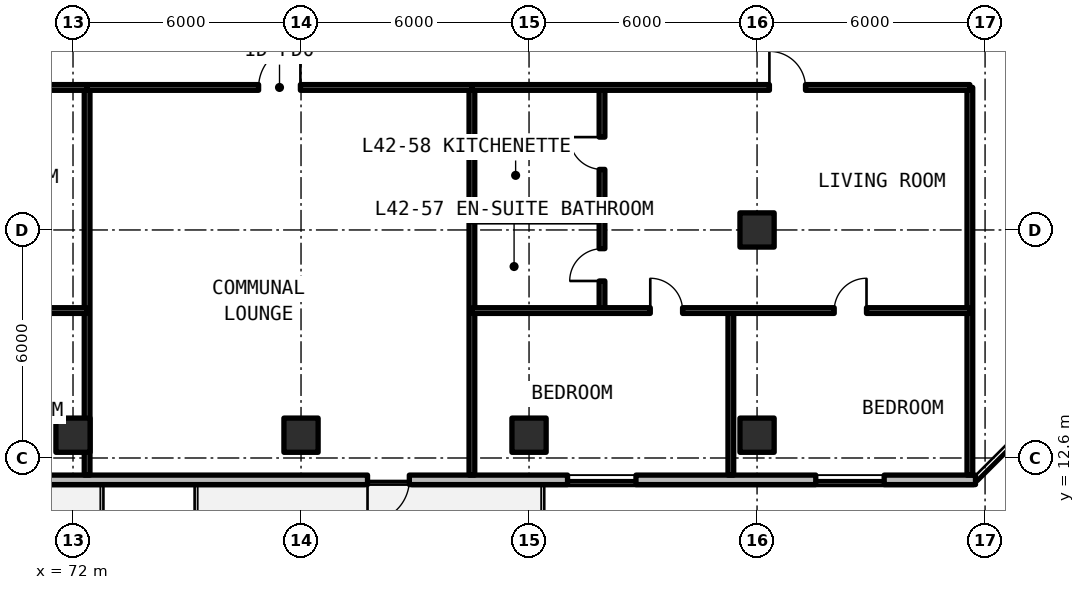
"""IFC4 building model, lengths in metres.
Left out: names, types, materials, properties, quantities, classifications, styles, units other than length and angle.
Written with IfcOpenShell. Run it as: python <this file> out.ifc"""

import sys

from ifc_helpers import new_model, si_unit, direction, frame, frame_2d, origin, origin_2d, place, context, subcontext, project, spatial, rectangle, extrude, element, fill, save


model = new_model("IFC4")
c1 = context("Model", 3, precision=1e-05, world=origin(), true_north=direction((0.0, 1.0)))
c2 = subcontext(c1, "Body", "Model", "MODEL_VIEW")
j1 = project(units=[si_unit("LENGTHUNIT", "METRE"), si_unit("PLANEANGLEUNIT", "RADIAN")], contexts=[c1])
p1 = place(None, origin())
s1 = spatial("IfcSite", under=j1, at=p1, CompositionType="ELEMENT")
p2 = place(p1, origin())
s2 = spatial("IfcBuilding", under=s1, at=p2, CompositionType="ELEMENT")
p3 = place(p2, frame((0.0, 0.0, 151.8)))
s3 = spatial("IfcBuildingStorey", under=s2, at=p3, CompositionType="ELEMENT", Elevation=151.8)
for number, where, z_axis, x_axis in (
    (1, (90.0, 18.6, 0.0), (0.0, 0.0, 1.0), (1.0, 0.0, 0.0)),
    (2, (72.0, 13.2, 0.0), (0.0, 0.0, 1.0), (1.0, 0.0, 0.0)),
    (3, (78.0, 13.2, 0.0), (0.0, 0.0, 1.0), (1.0, 0.0, 0.0)),
    (4, (84.0, 13.2, 0.0), (0.0, 0.0, 1.0), (1.0, 0.0, 0.0)),
    (5, (90.0, 13.2, 0.0), (0.0, 0.0, 1.0), (1.0, 0.0, 0.0)),
):
    element("IfcColumn", number, at=place(p3, frame(where, z_axis=z_axis, x_axis=x_axis)), inside=s3, PredefinedType="COLUMN", context=c2, shape_type="SweptSolid", body=[
        extrude(rectangle(XDim=0.9, YDim=0.9, at=origin_2d()), origin(), (0.0, 0.0, 1.0), 3.3),
    ])
p4 = place(p3, frame((52.125, 12.025, 0.0), z_axis=(0.0, 0.0, 1.0), x_axis=(1.0, 0.0, 0.0)))
e6 = element("IfcWall", 6, at=p4, inside=s3, PredefinedType="SOLIDWALL", context=c2, shape_type="SweptSolid", body=[
    extrude(rectangle(XDim=43.623, YDim=0.25, at=frame_2d((21.812, 0.0))), origin(), (0.0, 0.0, 1.0), 3.08),
])
p5 = place(p4, frame((15.775, 0.0, 0.0)))
e7 = element("IfcOpeningElement", 7, at=p5, cuts=e6, PredefinedType="OPENING", context=c2, shape_type="SweptSolid", body=[
    extrude(rectangle(XDim=1.1, YDim=2.15, at=frame_2d((0.55, 1.075))), frame((0.0, 0.135, 0.0), z_axis=(0.0, -1.0, 0.0), x_axis=(1.0, 0.0, 0.0)), (0.0, 0.0, 1.0), 0.27),
])
p6 = place(p4, frame((27.625, 0.0, 0.0)))
e8 = element("IfcOpeningElement", 8, at=p6, cuts=e6, PredefinedType="OPENING", context=c2, shape_type="SweptSolid", body=[
    extrude(rectangle(XDim=1.1, YDim=2.15, at=frame_2d((0.55, 1.075))), frame((0.0, 0.135, 0.0), z_axis=(0.0, -1.0, 0.0), x_axis=(1.0, 0.0, 0.0)), (0.0, 0.0, 1.0), 0.27),
])
p7 = place(p4, frame((2.669, 0.0, 0.78)))
e9 = element("IfcOpeningElement", 9, at=p7, cuts=e6, PredefinedType="OPENING", context=c2, shape_type="SweptSolid", body=[
    extrude(rectangle(XDim=1.8, YDim=1.66, at=frame_2d((0.9, 0.83))), frame((0.0, 0.135, 0.0), z_axis=(0.0, -1.0, 0.0), x_axis=(1.0, 0.0, 0.0)), (0.0, 0.0, 1.0), 0.27),
])
p8 = place(p4, frame((9.659, 0.0, 0.78)))
e10 = element("IfcOpeningElement", 10, at=p8, cuts=e6, PredefinedType="OPENING", context=c2, shape_type="SweptSolid", body=[
    extrude(rectangle(XDim=1.8, YDim=1.66, at=frame_2d((0.9, 0.83))), frame((0.0, 0.135, 0.0), z_axis=(0.0, -1.0, 0.0), x_axis=(1.0, 0.0, 0.0)), (0.0, 0.0, 1.0), 0.27),
])
p9 = place(p4, frame((32.888, 0.0, 0.78)))
e11 = element("IfcOpeningElement", 11, at=p9, cuts=e6, PredefinedType="OPENING", context=c2, shape_type="SweptSolid", body=[
    extrude(rectangle(XDim=1.8, YDim=1.66, at=frame_2d((0.9, 0.83))), frame((0.0, 0.135, 0.0), z_axis=(0.0, -1.0, 0.0), x_axis=(1.0, 0.0, 0.0)), (0.0, 0.0, 1.0), 0.27),
])
p10 = place(p4, frame((39.42, 0.0, 0.78)))
e12 = element("IfcOpeningElement", 12, at=p10, cuts=e6, PredefinedType="OPENING", context=c2, shape_type="SweptSolid", body=[
    extrude(rectangle(XDim=1.8, YDim=1.66, at=frame_2d((0.9, 0.83))), frame((0.0, 0.135, 0.0), z_axis=(0.0, -1.0, 0.0), x_axis=(1.0, 0.0, 0.0)), (0.0, 0.0, 1.0), 0.27),
])
for number, where, z_axis, x_axis in (
    (13, (95.6, 12.15, 0.0), (0.0, 0.0, 1.0), (0.0, 1.0, 0.0)),
    (14, (72.371, 12.15, 0.0), (0.0, 0.0, 1.0), (0.0, 1.0, 0.0)),
):
    element("IfcWall", number, at=place(p3, frame(where, z_axis=z_axis, x_axis=x_axis)), inside=s3, PredefinedType="SOLIDWALL", context=c2, shape_type="SweptSolid", body=[
        extrude(rectangle(XDim=10.2, YDim=0.15, at=frame_2d((5.1, 0.0))), origin(), (0.0, 0.0, 1.0), 2.35),
    ])
p11 = place(p3, frame((59.267, 16.479, 0.0), z_axis=(0.0, 0.0, 1.0), x_axis=(1.0, 0.0, 0.0)))
e15 = element("IfcWall", 15, at=p11, inside=s3, PredefinedType="PARTITIONING", context=c2, shape_type="SweptSolid", body=[
    extrude(rectangle(XDim=13.104, YDim=0.15, at=frame_2d((6.552, 0.0))), origin(), (0.0, 0.0, 1.0), 2.35),
])
p12 = place(p11, frame((4.308, 0.0, 0.0)))
e16 = element("IfcOpeningElement", 16, at=p12, cuts=e15, PredefinedType="OPENING", context=c2, shape_type="SweptSolid", body=[
    extrude(rectangle(XDim=0.85, YDim=2.1, at=frame_2d((0.425, 1.05))), frame((0.0, 0.085, 0.0), z_axis=(0.0, -1.0, 0.0), x_axis=(1.0, 0.0, 0.0)), (0.0, 0.0, 1.0), 0.17),
])
p13 = place(p11, frame((9.534, 0.0, 0.0)))
e17 = element("IfcOpeningElement", 17, at=p13, cuts=e15, PredefinedType="OPENING", context=c2, shape_type="SweptSolid", body=[
    extrude(rectangle(XDim=0.85, YDim=2.1, at=frame_2d((0.425, 1.05))), frame((0.0, 0.085, 0.0), z_axis=(0.0, -1.0, 0.0), x_axis=(1.0, 0.0, 0.0)), (0.0, 0.0, 1.0), 0.17),
])
p14 = place(p3, frame((59.267, 22.35, 0.0), z_axis=(0.0, 0.0, 1.0), x_axis=(1.0, 0.0, 0.0)))
e18 = element("IfcWall", 18, at=p14, inside=s3, PredefinedType="SOLIDWALL", context=c2, shape_type="SweptSolid", body=[
    extrude(rectangle(XDim=13.104, YDim=0.15, at=frame_2d((6.552, 0.0))), origin(), (0.0, 0.0, 1.0), 2.35),
])
p15 = place(p14, frame((7.443, 0.0, 0.0)))
e19 = element("IfcOpeningElement", 19, at=p15, cuts=e18, PredefinedType="OPENING", context=c2, shape_type="SweptSolid", body=[
    extrude(rectangle(XDim=0.95, YDim=2.15, at=frame_2d((0.475, 1.075))), frame((0.0, 0.085, 0.0), z_axis=(0.0, -1.0, 0.0), x_axis=(1.0, 0.0, 0.0)), (0.0, 0.0, 1.0), 0.17),
])
p16 = place(p3, frame((82.497, 12.15, 0.0), z_axis=(0.0, 0.0, 1.0), x_axis=(0.0, 1.0, 0.0)))
e20 = element("IfcWall", 20, at=p16, inside=s3, PredefinedType="SOLIDWALL", context=c2, shape_type="SweptSolid", body=[
    extrude(rectangle(XDim=10.2, YDim=0.15, at=frame_2d((5.1, 0.0))), origin(), (0.0, 0.0, 1.0), 2.35),
])
p17 = place(p3, frame((72.371, 22.35, 0.0), z_axis=(0.0, 0.0, 1.0), x_axis=(1.0, 0.0, 0.0)))
e21 = element("IfcWall", 21, at=p17, inside=s3, PredefinedType="SOLIDWALL", context=c2, shape_type="SweptSolid", body=[
    extrude(rectangle(XDim=10.125, YDim=0.15, at=frame_2d((5.063, 0.0))), origin(), (0.0, 0.0, 1.0), 2.35),
])
p18 = place(p17, frame((4.513, 0.0, 0.0)))
e22 = element("IfcOpeningElement", 22, at=p18, cuts=e21, PredefinedType="OPENING", context=c2, shape_type="SweptSolid", body=[
    extrude(rectangle(XDim=1.1, YDim=2.15, at=frame_2d((0.55, 1.075))), frame((0.0, 0.085, 0.0), z_axis=(0.0, -1.0, 0.0), x_axis=(1.0, 0.0, 0.0)), (0.0, 0.0, 1.0), 0.17),
])
p19 = place(p3, frame((82.497, 18.886, 0.0), z_axis=(0.0, 0.0, 1.0), x_axis=(1.0, 0.0, 0.0)))
e23 = element("IfcWall", 23, at=p19, inside=s3, PredefinedType="PARTITIONING", context=c2, shape_type="SweptSolid", body=[
    extrude(rectangle(XDim=3.423, YDim=0.15, at=frame_2d((1.712, 0.0))), origin(), (0.0, 0.0, 1.0), 2.35),
])
p20 = place(p3, frame((85.92, 16.479, 0.0), z_axis=(0.0, 0.0, 1.0), x_axis=(0.0, 1.0, 0.0)))
e24 = element("IfcWall", 24, at=p20, inside=s3, PredefinedType="PARTITIONING", context=c2, shape_type="SweptSolid", body=[
    extrude(rectangle(XDim=5.871, YDim=0.15, at=frame_2d((2.935, 0.0))), origin(), (0.0, 0.0, 1.0), 2.35),
])
p21 = place(p20, frame((0.779, 0.0, 0.0)))
e25 = element("IfcOpeningElement", 25, at=p21, cuts=e24, PredefinedType="OPENING", context=c2, shape_type="SweptSolid", body=[
    extrude(rectangle(XDim=0.85, YDim=2.1, at=frame_2d((0.425, 1.05))), frame((0.0, 0.085, 0.0), z_axis=(0.0, -1.0, 0.0), x_axis=(1.0, 0.0, 0.0)), (0.0, 0.0, 1.0), 0.17),
])
p22 = place(p20, frame((3.714, 0.0, 0.0)))
e26 = element("IfcOpeningElement", 26, at=p22, cuts=e24, PredefinedType="OPENING", context=c2, shape_type="SweptSolid", body=[
    extrude(rectangle(XDim=0.85, YDim=2.1, at=frame_2d((0.425, 1.05))), frame((0.0, 0.085, 0.0), z_axis=(0.0, -1.0, 0.0), x_axis=(1.0, 0.0, 0.0)), (0.0, 0.0, 1.0), 0.17),
])
p23 = place(p3, frame((89.31, 12.15, 0.0), z_axis=(0.0, 0.0, 1.0), x_axis=(0.0, 1.0, 0.0)))
e27 = element("IfcWall", 27, at=p23, inside=s3, PredefinedType="PARTITIONING", context=c2, shape_type="SweptSolid", body=[
    extrude(rectangle(XDim=4.33, YDim=0.15, at=frame_2d((2.165, 0.0))), origin(), (0.0, 0.0, 1.0), 2.35),
])
p24 = place(p3, frame((82.497, 16.479, 0.0), z_axis=(0.0, 0.0, 1.0), x_axis=(1.0, 0.0, 0.0)))
e28 = element("IfcWall", 28, at=p24, inside=s3, PredefinedType="PARTITIONING", context=c2, shape_type="SweptSolid", body=[
    extrude(rectangle(XDim=13.104, YDim=0.15, at=frame_2d((6.552, 0.0))), origin(), (0.0, 0.0, 1.0), 2.35),
])
p25 = place(p24, frame((4.694, 0.0, 0.0)))
e29 = element("IfcOpeningElement", 29, at=p25, cuts=e28, PredefinedType="OPENING", context=c2, shape_type="SweptSolid", body=[
    extrude(rectangle(XDim=0.85, YDim=2.1, at=frame_2d((0.425, 1.05))), frame((0.0, 0.085, 0.0), z_axis=(0.0, -1.0, 0.0), x_axis=(1.0, 0.0, 0.0)), (0.0, 0.0, 1.0), 0.17),
])
p26 = place(p24, frame((9.534, 0.0, 0.0)))
e30 = element("IfcOpeningElement", 30, at=p26, cuts=e28, PredefinedType="OPENING", context=c2, shape_type="SweptSolid", body=[
    extrude(rectangle(XDim=0.85, YDim=2.1, at=frame_2d((0.425, 1.05))), frame((0.0, 0.085, 0.0), z_axis=(0.0, -1.0, 0.0), x_axis=(1.0, 0.0, 0.0)), (0.0, 0.0, 1.0), 0.17),
])
p27 = place(p3, frame((82.497, 22.35, 0.0), z_axis=(0.0, 0.0, 1.0), x_axis=(1.0, 0.0, 0.0)))
e31 = element("IfcWall", 31, at=p27, inside=s3, PredefinedType="SOLIDWALL", context=c2, shape_type="SweptSolid", body=[
    extrude(rectangle(XDim=13.104, YDim=0.15, at=frame_2d((6.552, 0.0))), origin(), (0.0, 0.0, 1.0), 2.35),
])
p28 = place(p27, frame((7.829, 0.0, 0.0)))
e32 = element("IfcOpeningElement", 32, at=p28, cuts=e31, PredefinedType="OPENING", context=c2, shape_type="SweptSolid", body=[
    extrude(rectangle(XDim=0.95, YDim=2.15, at=frame_2d((0.475, 1.075))), frame((0.0, 0.085, 0.0), z_axis=(0.0, -1.0, 0.0), x_axis=(1.0, 0.0, 0.0)), (0.0, 0.0, 1.0), 0.17),
])
p29 = place(p6, frame((1.1, 0.0, 0.0), z_axis=(0.0, 0.0, 1.0), x_axis=(-1.0, 0.0, 0.0)))
e33 = element("IfcDoor", 33, at=p29, inside=s3, OperationType="SINGLE_SWING_RIGHT", PredefinedType="DOOR", context=c2, shape_type="SweptSolid", body=[
    extrude(rectangle(XDim=1.1, YDim=2.15, at=frame_2d((0.55, 1.075))), frame((0.0, 0.025, 0.0), z_axis=(0.0, -1.0, 0.0), x_axis=(1.0, 0.0, 0.0)), (0.0, 0.0, 1.0), 0.05),
])
fill(e8, e33)
p30 = place(p9, origin())
e34 = element("IfcWindow", 34, at=p30, inside=s3, PartitioningType="SINGLE_PANEL", PredefinedType="WINDOW", context=c2, shape_type="SweptSolid", body=[
    extrude(rectangle(XDim=1.8, YDim=1.66, at=frame_2d((0.9, 0.83))), frame((0.0, 0.03, 0.0), z_axis=(0.0, -1.0, 0.0), x_axis=(1.0, 0.0, 0.0)), (0.0, 0.0, 1.0), 0.06),
])
fill(e11, e34)
p31 = place(p10, origin())
e35 = element("IfcWindow", 35, at=p31, inside=s3, PartitioningType="SINGLE_PANEL", PredefinedType="WINDOW", context=c2, shape_type="SweptSolid", body=[
    extrude(rectangle(XDim=1.8, YDim=1.66, at=frame_2d((0.9, 0.83))), frame((0.0, 0.03, 0.0), z_axis=(0.0, -1.0, 0.0), x_axis=(1.0, 0.0, 0.0)), (0.0, 0.0, 1.0), 0.06),
])
fill(e12, e35)
p32 = place(p18, origin())
e36 = element("IfcDoor", 36, at=p32, inside=s3, OperationType="SINGLE_SWING_RIGHT", PredefinedType="DOOR", context=c2, shape_type="SweptSolid", body=[
    extrude(rectangle(XDim=1.1, YDim=2.15, at=frame_2d((0.55, 1.075))), frame((0.0, 0.025, 0.0), z_axis=(0.0, -1.0, 0.0), x_axis=(1.0, 0.0, 0.0)), (0.0, 0.0, 1.0), 0.05),
])
fill(e22, e36)
p33 = place(p21, origin())
e37 = element("IfcDoor", 37, at=p33, inside=s3, OperationType="SINGLE_SWING_LEFT", PredefinedType="DOOR", context=c2, shape_type="SweptSolid", body=[
    extrude(rectangle(XDim=0.85, YDim=2.1, at=frame_2d((0.425, 1.05))), frame((0.0, 0.025, 0.0), z_axis=(0.0, -1.0, 0.0), x_axis=(1.0, 0.0, 0.0)), (0.0, 0.0, 1.0), 0.05),
])
fill(e25, e37)
p34 = place(p22, origin())
e38 = element("IfcDoor", 38, at=p34, inside=s3, OperationType="SINGLE_SWING_RIGHT", PredefinedType="DOOR", context=c2, shape_type="SweptSolid", body=[
    extrude(rectangle(XDim=0.85, YDim=2.1, at=frame_2d((0.425, 1.05))), frame((0.0, 0.025, 0.0), z_axis=(0.0, -1.0, 0.0), x_axis=(1.0, 0.0, 0.0)), (0.0, 0.0, 1.0), 0.05),
])
fill(e26, e38)
p35 = place(p25, origin())
e39 = element("IfcDoor", 39, at=p35, inside=s3, OperationType="SINGLE_SWING_LEFT", PredefinedType="DOOR", context=c2, shape_type="SweptSolid", body=[
    extrude(rectangle(XDim=0.85, YDim=2.1, at=frame_2d((0.425, 1.05))), frame((0.0, 0.025, 0.0), z_axis=(0.0, -1.0, 0.0), x_axis=(1.0, 0.0, 0.0)), (0.0, 0.0, 1.0), 0.05),
])
fill(e29, e39)
p36 = place(p26, origin())
e40 = element("IfcDoor", 40, at=p36, inside=s3, OperationType="SINGLE_SWING_RIGHT", PredefinedType="DOOR", context=c2, shape_type="SweptSolid", body=[
    extrude(rectangle(XDim=0.85, YDim=2.1, at=frame_2d((0.425, 1.05))), frame((0.0, 0.025, 0.0), z_axis=(0.0, -1.0, 0.0), x_axis=(1.0, 0.0, 0.0)), (0.0, 0.0, 1.0), 0.05),
])
fill(e30, e40)
p37 = place(p28, origin())
e41 = element("IfcDoor", 41, at=p37, inside=s3, OperationType="SINGLE_SWING_LEFT", PredefinedType="DOOR", context=c2, shape_type="SweptSolid", body=[
    extrude(rectangle(XDim=0.95, YDim=2.15, at=frame_2d((0.475, 1.075))), frame((0.0, 0.025, 0.0), z_axis=(0.0, -1.0, 0.0), x_axis=(1.0, 0.0, 0.0)), (0.0, 0.0, 1.0), 0.05),
])
fill(e32, e41)
save(model, sys.argv[1])
